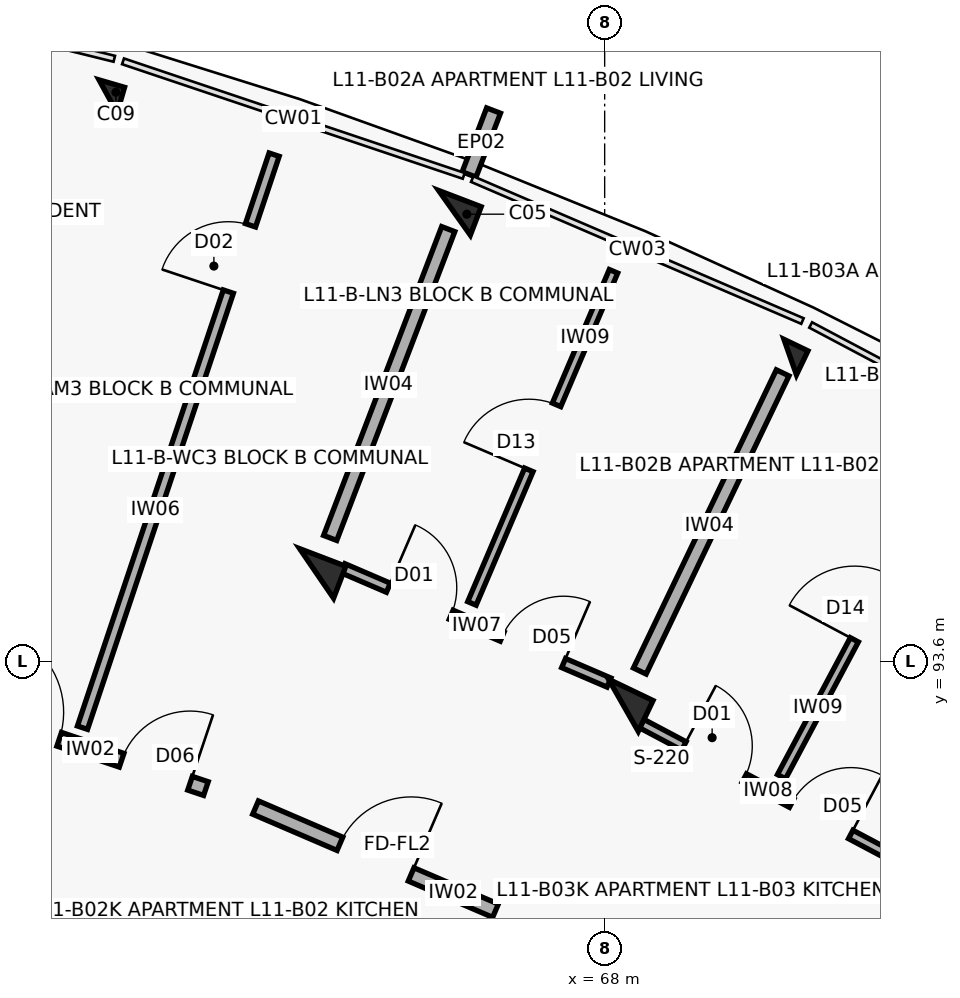
"""IFC4 building model, lengths in metres.
Left out: names, types, materials, properties, quantities, classifications, styles, units other than length and angle.
Written with IfcOpenShell. Run it as: python <this file> out.ifc"""

import sys

from ifc_helpers import new_model, si_unit, direction, frame, frame_2d, origin, origin_2d, place, context, subcontext, project, spatial, rectangle, extrude, element, fill, save


model = new_model("IFC4")
c1 = context("Model", 3, precision=1e-05, world=origin(), true_north=direction((0.0, 1.0)))
c2 = subcontext(c1, "Body", "Model", "MODEL_VIEW")
j1 = project(units=[si_unit("LENGTHUNIT", "METRE"), si_unit("PLANEANGLEUNIT", "RADIAN")], contexts=[c1])
p1 = place(None, origin())
s1 = spatial("IfcSite", under=j1, at=p1, CompositionType="ELEMENT")
p2 = place(p1, origin())
s2 = spatial("IfcBuilding", under=s1, at=p2, CompositionType="ELEMENT")
p3 = place(p2, frame((0.0, 0.0, 36.0)))
s3 = spatial("IfcBuildingStorey", under=s2, at=p3, CompositionType="ELEMENT", Elevation=36.0)
p4 = place(p3, frame((61.467, 101.031, 0.0), z_axis=(0.0, 0.0, 1.0), x_axis=(0.27966144946, 0.96009867914, 0.0)))
e1 = element("IfcColumn", 1, at=p4, inside=s3, PredefinedType="COLUMN", context=c2, shape_type="SweptSolid", body=[
    extrude(rectangle(XDim=0.35, YDim=0.35, at=origin_2d()), origin(), (0.0, 0.0, 1.0), 3.1),
])
p5 = place(p3, frame((64.21, 94.753, 0.0), z_axis=(0.0, 0.0, 1.0), x_axis=(0.357064076459, 0.934079892355, 0.0)))
e2 = element("IfcColumn", 2, at=p5, inside=s3, PredefinedType="COLUMN", context=c2, shape_type="SweptSolid", body=[
    extrude(rectangle(XDim=0.45, YDim=0.65, at=origin_2d()), origin(), (0.0, 0.0, 1.0), 3.1),
])
p6 = place(p3, frame((66.024, 99.499, 0.0), z_axis=(0.0, 0.0, 1.0), x_axis=(0.357064076459, 0.934079892355, 0.0)))
e3 = element("IfcColumn", 3, at=p6, inside=s3, PredefinedType="COLUMN", context=c2, shape_type="SweptSolid", body=[
    extrude(rectangle(XDim=0.4, YDim=0.6, at=origin_2d()), origin(), (0.0, 0.0, 1.0), 3.1),
])
p7 = place(p3, frame((68.246, 93.019, 0.0), z_axis=(0.0, 0.0, 1.0), x_axis=(0.432085748802, 0.901832526405, 0.0)))
e4 = element("IfcColumn", 4, at=p7, inside=s3, PredefinedType="COLUMN", context=c2, shape_type="SweptSolid", body=[
    extrude(rectangle(XDim=0.45, YDim=0.65, at=origin_2d()), origin(), (0.0, 0.0, 1.0), 3.1),
])
p8 = place(p3, frame((70.441, 97.6, 0.0), z_axis=(0.0, 0.0, 1.0), x_axis=(0.432085748802, 0.901832526405, 0.0)))
e5 = element("IfcColumn", 5, at=p8, inside=s3, PredefinedType="COLUMN", context=c2, shape_type="SweptSolid", body=[
    extrude(rectangle(XDim=0.35, YDim=0.35, at=origin_2d()), origin(), (0.0, 0.0, 1.0), 3.1),
])
p9 = place(p3, frame((66.217, 100.003, 0.0), z_axis=(0.0, 0.0, 1.0), x_axis=(0.356942580168, 0.934126326823, 0.0)))
e6 = element("IfcWall", 6, at=p9, inside=s3, PredefinedType="PARAPET", context=c2, shape_type="SweptSolid", body=[
    extrude(rectangle(XDim=0.9, YDim=0.195, at=frame_2d((0.45, 0.0))), origin(), (0.0, 0.0, 1.0), 2.25),
])
p10 = place(p3, frame((59.497, 93.018, 0.0), z_axis=(0.0, 0.0, 1.0), x_axis=(0.947863007629, -0.318678080151, 0.0)))
e7 = element("IfcWall", 7, at=p10, inside=s3, PredefinedType="SOLIDWALL", context=c2, shape_type="SweptSolid", body=[
    extrude(rectangle(XDim=3.436, YDim=0.19, at=frame_2d((1.718, 0.0))), origin(), (0.0, 0.0, 1.0), 2.14),
])
p11 = place(p10, frame((0.28, 0.0, 0.0)))
e8 = element("IfcOpeningElement", 8, at=p11, cuts=e7, PredefinedType="OPENING", context=c2, shape_type="SweptSolid", body=[
    extrude(rectangle(XDim=1.12, YDim=2.15, at=frame_2d((0.56, 1.075))), frame((0.0, 0.105, 0.0), z_axis=(0.0, -1.0, 0.0), x_axis=(1.0, 0.0, 0.0)), (0.0, 0.0, 1.0), 0.21),
])
p12 = place(p10, frame((2.266, 0.0, 0.0)))
e9 = element("IfcOpeningElement", 9, at=p12, cuts=e7, PredefinedType="OPENING", context=c2, shape_type="SweptSolid", body=[
    extrude(rectangle(XDim=0.95, YDim=2.1, at=frame_2d((0.475, 1.05))), frame((0.0, 0.105, 0.0), z_axis=(0.0, -1.0, 0.0), x_axis=(1.0, 0.0, 0.0)), (0.0, 0.0, 1.0), 0.21),
])
p13 = place(p3, frame((61.13, 92.724, 0.0), z_axis=(0.0, 0.0, 1.0), x_axis=(0.317204178278, 0.948357268798, 0.0)))
e10 = element("IfcWall", 10, at=p13, inside=s3, PredefinedType="PARTITIONING", context=c2, shape_type="SweptSolid", body=[
    extrude(rectangle(XDim=7.95, YDim=0.14, at=frame_2d((3.975, 0.0))), origin(), (0.0, 0.0, 1.0), 2.14),
])
p14 = place(p13, frame((6.05, 0.0, 0.0)))
e11 = element("IfcOpeningElement", 11, at=p14, cuts=e10, PredefinedType="OPENING", context=c2, shape_type="SweptSolid", body=[
    extrude(rectangle(XDim=0.92, YDim=2.1, at=frame_2d((0.46, 1.05))), frame((0.0, 0.08, 0.0), z_axis=(0.0, -1.0, 0.0), x_axis=(1.0, 0.0, 0.0)), (0.0, 0.0, 1.0), 0.16),
])
p15 = place(p3, frame((63.407, 91.673, 0.0), z_axis=(0.0, 0.0, 1.0), x_axis=(0.918718172399, -0.394913813008, 0.0)))
e12 = element("IfcWall", 12, at=p15, inside=s3, PredefinedType="SOLIDWALL", context=c2, shape_type="SweptSolid", body=[
    extrude(rectangle(XDim=3.436, YDim=0.19, at=frame_2d((1.718, 0.0))), origin(), (0.0, 0.0, 1.0), 2.14),
])
p16 = place(p15, frame((1.208, 0.0, 0.0)))
e13 = element("IfcOpeningElement", 13, at=p16, cuts=e12, PredefinedType="OPENING", context=c2, shape_type="SweptSolid", body=[
    extrude(rectangle(XDim=1.02, YDim=2.15, at=frame_2d((0.51, 1.075))), frame((0.0, 0.105, 0.0), z_axis=(0.0, -1.0, 0.0), x_axis=(1.0, 0.0, 0.0)), (0.0, 0.0, 1.0), 0.21),
])
p17 = place(p3, frame((64.557, 94.822, 0.0), z_axis=(0.0, 0.0, 1.0), x_axis=(0.918726854017, -0.394893615684, 0.0)))
e14 = element("IfcWall", 14, at=p17, inside=s3, PredefinedType="PARTITIONING", context=c2, shape_type="SweptSolid", body=[
    extrude(rectangle(XDim=3.81, YDim=0.13, at=frame_2d((1.905, 0.0))), origin(), (0.0, 0.0, 1.0), 2.14),
])
p18 = place(p17, frame((0.65, 0.0, 0.0)))
e15 = element("IfcOpeningElement", 15, at=p18, cuts=e14, PredefinedType="OPENING", context=c2, shape_type="SweptSolid", body=[
    extrude(rectangle(XDim=0.9, YDim=2.1, at=frame_2d((0.45, 1.05))), frame((0.0, 0.075, 0.0), z_axis=(0.0, -1.0, 0.0), x_axis=(1.0, 0.0, 0.0)), (0.0, 0.0, 1.0), 0.15),
])
p19 = place(p17, frame((2.28, 0.0, 0.0)))
e16 = element("IfcOpeningElement", 16, at=p19, cuts=e14, PredefinedType="OPENING", context=c2, shape_type="SweptSolid", body=[
    extrude(rectangle(XDim=0.88, YDim=2.1, at=frame_2d((0.44, 1.05))), frame((0.0, 0.075, 0.0), z_axis=(0.0, -1.0, 0.0), x_axis=(1.0, 0.0, 0.0)), (0.0, 0.0, 1.0), 0.15),
])
p20 = place(p3, frame((66.253, 94.359, 0.0), z_axis=(0.0, 0.0, 1.0), x_axis=(0.392156908456, 0.919898341748, 0.0)))
e17 = element("IfcWall", 17, at=p20, inside=s3, PredefinedType="PARTITIONING", context=c2, shape_type="SweptSolid", body=[
    extrude(rectangle(XDim=4.75, YDim=0.12, at=frame_2d((2.375, 0.0))), origin(), (0.0, 0.0, 1.0), 2.14),
])
p21 = place(p20, frame((1.91, 0.0, 0.0)))
e18 = element("IfcOpeningElement", 18, at=p21, cuts=e17, PredefinedType="OPENING", context=c2, shape_type="SweptSolid", body=[
    extrude(rectangle(XDim=0.93, YDim=2.1, at=frame_2d((0.465, 1.05))), frame((0.0, 0.07, 0.0), z_axis=(0.0, -1.0, 0.0), x_axis=(1.0, 0.0, 0.0)), (0.0, 0.0, 1.0), 0.14),
])
p22 = place(p3, frame((64.389, 95.22, 0.0), z_axis=(0.0, 0.0, 1.0), x_axis=(0.357064016205, 0.934079915388, 0.0)))
e19 = element("IfcWall", 19, at=p22, inside=s3, PredefinedType="SOLIDWALL", context=c2, shape_type="SweptSolid", body=[
    extrude(rectangle(XDim=4.35, YDim=0.185, at=frame_2d((2.175, 0.0))), origin(), (0.0, 0.0, 1.0), 2.14),
])
p23 = place(p3, frame((68.468, 92.788, 0.0), z_axis=(0.0, 0.0, 1.0), x_axis=(0.883450371448, -0.468524749814, 0.0)))
e20 = element("IfcWall", 20, at=p23, inside=s3, PredefinedType="PARTITIONING", context=c2, shape_type="SweptSolid", body=[
    extrude(rectangle(XDim=3.785, YDim=0.125, at=frame_2d((1.893, 0.0))), origin(), (0.0, 0.0, 1.0), 2.14),
])
p24 = place(p23, frame((0.65, 0.0, 0.0)))
e21 = element("IfcOpeningElement", 21, at=p24, cuts=e20, PredefinedType="OPENING", context=c2, shape_type="SweptSolid", body=[
    extrude(rectangle(XDim=0.9, YDim=2.1, at=frame_2d((0.45, 1.05))), frame((0.0, 0.073, 0.0), z_axis=(0.0, -1.0, 0.0), x_axis=(1.0, 0.0, 0.0)), (0.0, 0.0, 1.0), 0.145),
])
p25 = place(p23, frame((2.255, 0.0, 0.0)))
e22 = element("IfcOpeningElement", 22, at=p25, cuts=e20, PredefinedType="OPENING", context=c2, shape_type="SweptSolid", body=[
    extrude(rectangle(XDim=0.88, YDim=2.1, at=frame_2d((0.44, 1.05))), frame((0.0, 0.073, 0.0), z_axis=(0.0, -1.0, 0.0), x_axis=(1.0, 0.0, 0.0)), (0.0, 0.0, 1.0), 0.145),
])
p26 = place(p3, frame((70.326, 92.079, 0.0), z_axis=(0.0, 0.0, 1.0), x_axis=(0.469847866249, 0.882747405876, 0.0)))
e23 = element("IfcWall", 23, at=p26, inside=s3, PredefinedType="PARTITIONING", context=c2, shape_type="SweptSolid", body=[
    extrude(rectangle(XDim=5.05, YDim=0.12, at=frame_2d((2.525, 0.0))), origin(), (0.0, 0.0, 1.0), 2.14),
])
p27 = place(p26, frame((2.04, 0.0, 0.0)))
e24 = element("IfcOpeningElement", 24, at=p27, cuts=e23, PredefinedType="OPENING", context=c2, shape_type="SweptSolid", body=[
    extrude(rectangle(XDim=0.97, YDim=2.1, at=frame_2d((0.485, 1.05))), frame((0.0, 0.07, 0.0), z_axis=(0.0, -1.0, 0.0), x_axis=(1.0, 0.0, 0.0)), (0.0, 0.0, 1.0), 0.14),
])
p28 = place(p3, frame((68.462, 93.469, 0.0), z_axis=(0.0, 0.0, 1.0), x_axis=(0.432086898897, 0.901831975371, 0.0)))
e25 = element("IfcWall", 25, at=p28, inside=s3, PredefinedType="SOLIDWALL", context=c2, shape_type="SweptSolid", body=[
    extrude(rectangle(XDim=4.35, YDim=0.185, at=frame_2d((2.175, 0.0))), origin(), (0.0, 0.0, 1.0), 2.14),
])
p29 = place(p11, origin())
e26 = element("IfcDoor", 26, at=p29, inside=s3, OperationType="SINGLE_SWING_LEFT", PredefinedType="DOOR", context=c2, shape_type="SweptSolid", body=[
    extrude(rectangle(XDim=1.12, YDim=2.15, at=frame_2d((0.56, 1.075))), frame((0.0, 0.025, 0.0), z_axis=(0.0, -1.0, 0.0), x_axis=(1.0, 0.0, 0.0)), (0.0, 0.0, 1.0), 0.05),
])
fill(e8, e26)
p30 = place(p12, origin())
e27 = element("IfcDoor", 27, at=p30, inside=s3, OperationType="SINGLE_SWING_RIGHT", PredefinedType="DOOR", context=c2, shape_type="SweptSolid", body=[
    extrude(rectangle(XDim=0.95, YDim=2.1, at=frame_2d((0.475, 1.05))), frame((0.0, 0.025, 0.0), z_axis=(0.0, -1.0, 0.0), x_axis=(1.0, 0.0, 0.0)), (0.0, 0.0, 1.0), 0.05),
])
fill(e9, e27)
p31 = place(p14, origin())
e28 = element("IfcDoor", 28, at=p31, inside=s3, OperationType="SINGLE_SWING_LEFT", PredefinedType="DOOR", context=c2, shape_type="SweptSolid", body=[
    extrude(rectangle(XDim=0.92, YDim=2.1, at=frame_2d((0.46, 1.05))), frame((0.0, 0.025, 0.0), z_axis=(0.0, -1.0, 0.0), x_axis=(1.0, 0.0, 0.0)), (0.0, 0.0, 1.0), 0.05),
])
fill(e11, e28)
p32 = place(p16, origin())
e29 = element("IfcDoor", 29, at=p32, inside=s3, OperationType="SINGLE_SWING_RIGHT", PredefinedType="DOOR", context=c2, shape_type="SweptSolid", body=[
    extrude(rectangle(XDim=1.02, YDim=2.15, at=frame_2d((0.51, 1.075))), frame((0.0, 0.025, 0.0), z_axis=(0.0, -1.0, 0.0), x_axis=(1.0, 0.0, 0.0)), (0.0, 0.0, 1.0), 0.05),
])
fill(e13, e29)
p33 = place(p18, origin())
e30 = element("IfcDoor", 30, at=p33, inside=s3, OperationType="SINGLE_SWING_LEFT", PredefinedType="DOOR", context=c2, shape_type="SweptSolid", body=[
    extrude(rectangle(XDim=0.9, YDim=2.1, at=frame_2d((0.45, 1.05))), frame((0.0, 0.025, 0.0), z_axis=(0.0, -1.0, 0.0), x_axis=(1.0, 0.0, 0.0)), (0.0, 0.0, 1.0), 0.05),
])
fill(e15, e30)
p34 = place(p19, origin())
e31 = element("IfcDoor", 31, at=p34, inside=s3, OperationType="SINGLE_SWING_RIGHT", PredefinedType="DOOR", context=c2, shape_type="SweptSolid", body=[
    extrude(rectangle(XDim=0.88, YDim=2.1, at=frame_2d((0.44, 1.05))), frame((0.0, 0.025, 0.0), z_axis=(0.0, -1.0, 0.0), x_axis=(1.0, 0.0, 0.0)), (0.0, 0.0, 1.0), 0.05),
])
fill(e16, e31)
p35 = place(p21, origin())
e32 = element("IfcDoor", 32, at=p35, inside=s3, OperationType="SINGLE_SWING_LEFT", PredefinedType="DOOR", context=c2, shape_type="SweptSolid", body=[
    extrude(rectangle(XDim=0.93, YDim=2.1, at=frame_2d((0.465, 1.05))), frame((0.0, 0.025, 0.0), z_axis=(0.0, -1.0, 0.0), x_axis=(1.0, 0.0, 0.0)), (0.0, 0.0, 1.0), 0.05),
])
fill(e18, e32)
p36 = place(p24, origin())
e33 = element("IfcDoor", 33, at=p36, inside=s3, OperationType="SINGLE_SWING_LEFT", PredefinedType="DOOR", context=c2, shape_type="SweptSolid", body=[
    extrude(rectangle(XDim=0.9, YDim=2.1, at=frame_2d((0.45, 1.05))), frame((0.0, 0.025, 0.0), z_axis=(0.0, -1.0, 0.0), x_axis=(1.0, 0.0, 0.0)), (0.0, 0.0, 1.0), 0.05),
])
fill(e21, e33)
p37 = place(p25, origin())
e34 = element("IfcDoor", 34, at=p37, inside=s3, OperationType="SINGLE_SWING_RIGHT", PredefinedType="DOOR", context=c2, shape_type="SweptSolid", body=[
    extrude(rectangle(XDim=0.88, YDim=2.1, at=frame_2d((0.44, 1.05))), frame((0.0, 0.025, 0.0), z_axis=(0.0, -1.0, 0.0), x_axis=(1.0, 0.0, 0.0)), (0.0, 0.0, 1.0), 0.05),
])
fill(e22, e34)
p38 = place(p27, origin())
e35 = element("IfcDoor", 35, at=p38, inside=s3, OperationType="SINGLE_SWING_LEFT", PredefinedType="DOOR", context=c2, shape_type="SweptSolid", body=[
    extrude(rectangle(XDim=0.97, YDim=2.1, at=frame_2d((0.485, 1.05))), frame((0.0, 0.025, 0.0), z_axis=(0.0, -1.0, 0.0), x_axis=(1.0, 0.0, 0.0)), (0.0, 0.0, 1.0), 0.05),
])
fill(e24, e35)
save(model, sys.argv[1])
